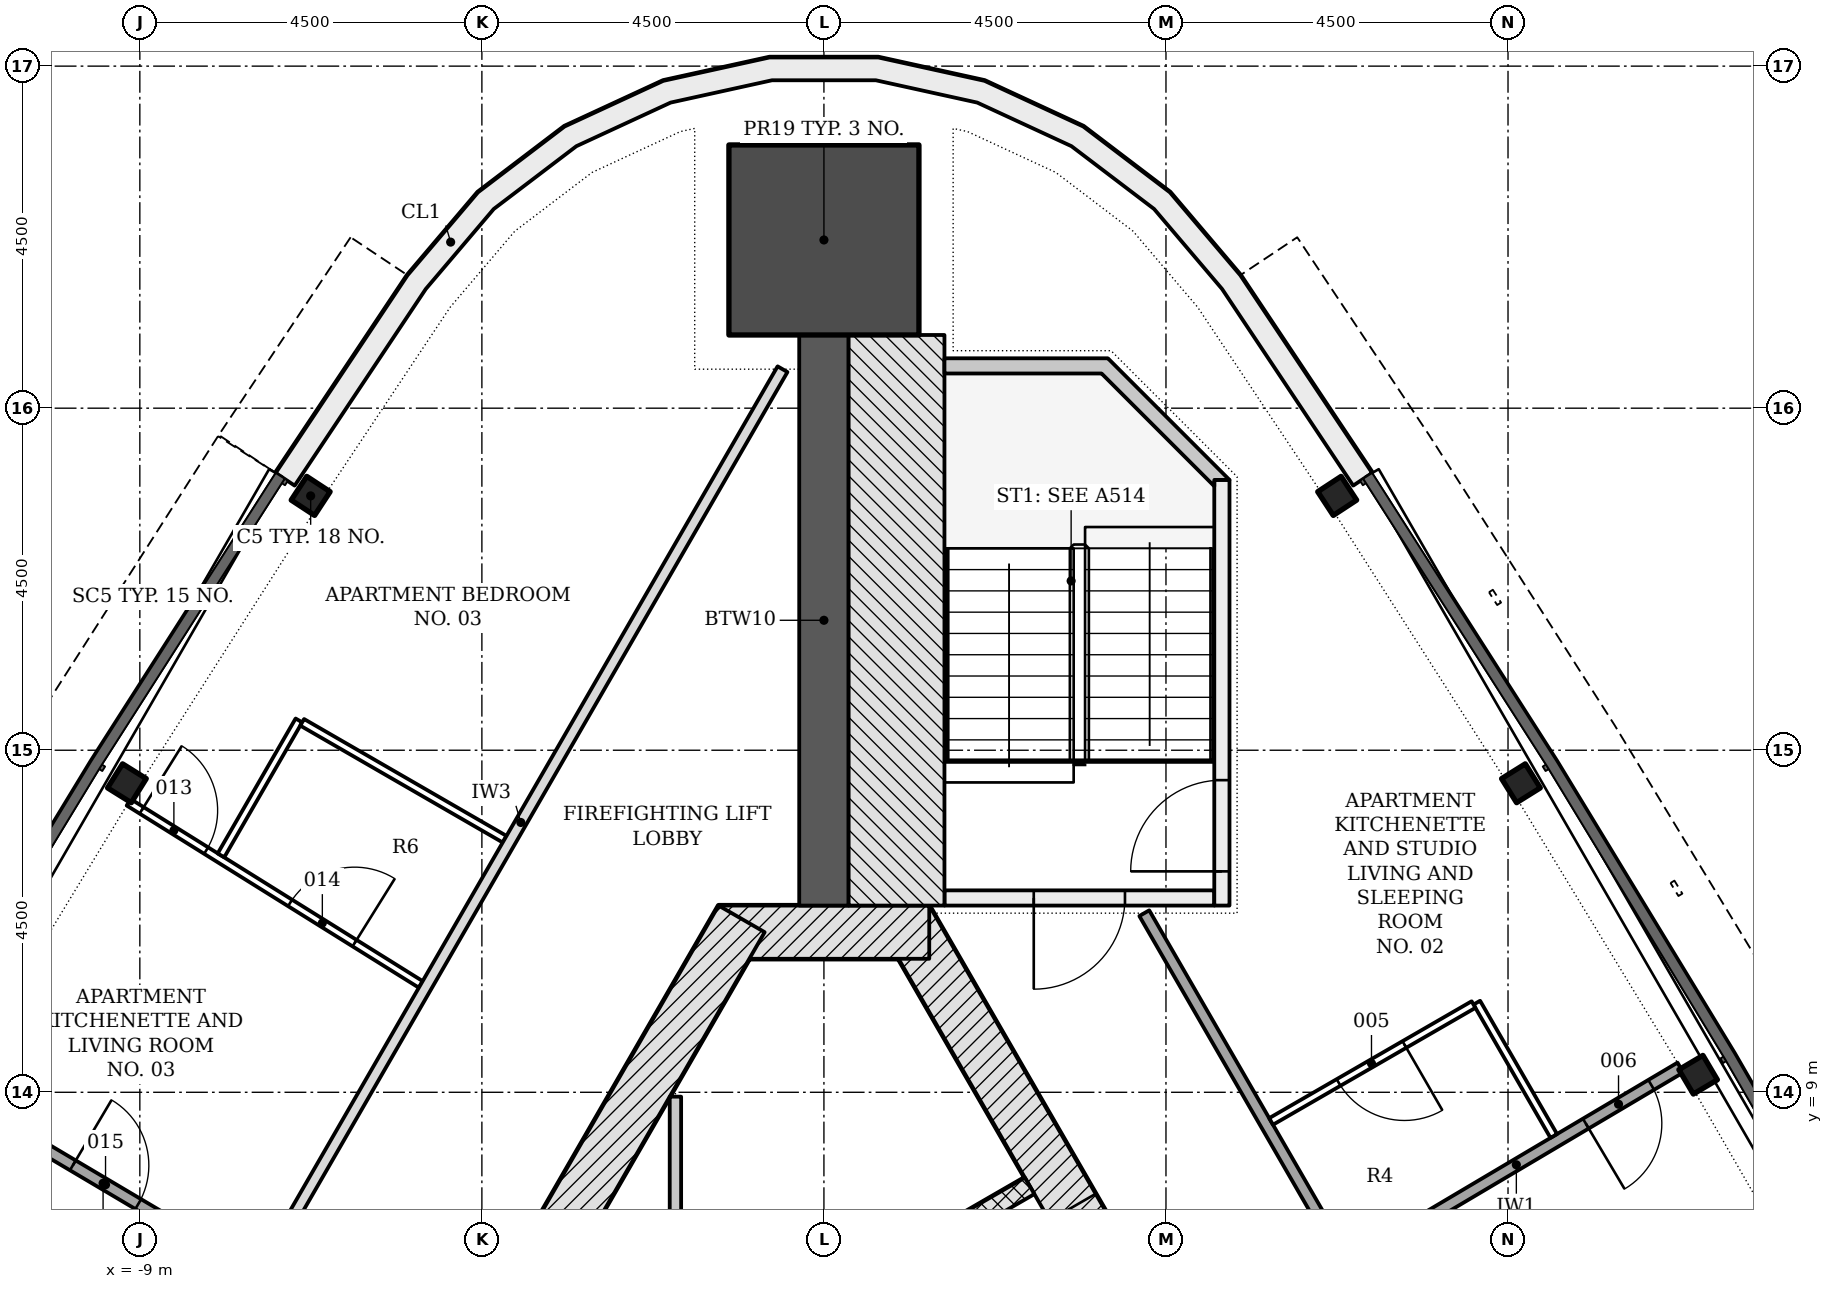
"""IFC4 building model, lengths in metres.
Left out: names, types, materials, properties, quantities, classifications, styles, units other than length and angle.
Written with IfcOpenShell. Run it as: python <this file> out.ifc"""

import sys

from ifc_helpers import new_model, si_unit, direction, frame, frame_2d, origin, origin_2d, place, context, subcontext, project, spatial, polyline, rectangle, i_section, outline, extrude, element, fill, save


model = new_model("IFC4")
c1 = context("Model", 3, precision=1e-05, world=origin(), true_north=direction((0.0, 1.0)))
c2 = subcontext(c1, "Body", "Model", "MODEL_VIEW")
j1 = project(units=[si_unit("LENGTHUNIT", "METRE"), si_unit("PLANEANGLEUNIT", "RADIAN")], contexts=[c1])
p1 = place(None, origin())
s1 = spatial("IfcSite", under=j1, at=p1, CompositionType="ELEMENT")
p2 = place(p1, origin())
s2 = spatial("IfcBuilding", under=s1, at=p2, CompositionType="ELEMENT")
p3 = place(p2, frame((0.0, 0.0, 232.8)))
s3 = spatial("IfcBuildingStorey", under=s2, at=p3, CompositionType="ELEMENT", Elevation=232.8)
p4 = place(p3, frame((10.311, -4.703, -0.2), z_axis=(0.0, 0.0, 1.0), x_axis=(-0.500001446645, 0.866024568562, 0.0)))
e1 = element("IfcWall", 1, at=p4, inside=s3, PredefinedType="SHEAR", context=c2, shape_type="SweptSolid", body=[
    extrude(rectangle(XDim=18.458, YDim=0.7, at=frame_2d((9.229, 0.0))), origin(), (0.0, 0.0, 1.0), 3.6),
])
p5 = place(p4, frame((4.379, 0.0, 0.2)))
e2 = element("IfcOpeningElement", 2, at=p5, cuts=e1, PredefinedType="OPENING", context=c2, shape_type="SweptSolid", body=[
    extrude(rectangle(XDim=1.1, YDim=2.1, at=frame_2d((0.55, 1.05))), frame((0.0, 0.36, 0.0), z_axis=(0.0, -1.0, 0.0), x_axis=(1.0, 0.0, 0.0)), (0.0, 0.0, 1.0), 0.72),
])
p6 = place(p4, frame((6.529, 0.0, 0.2)))
e3 = element("IfcOpeningElement", 3, at=p6, cuts=e1, PredefinedType="OPENING", context=c2, shape_type="SweptSolid", body=[
    extrude(rectangle(XDim=1.1, YDim=2.1, at=frame_2d((0.55, 1.05))), frame((0.0, 0.36, 0.0), z_axis=(0.0, -1.0, 0.0), x_axis=(1.0, 0.0, 0.0)), (0.0, 0.0, 1.0), 0.72),
])
p7 = place(p4, frame((8.679, 0.0, 0.2)))
e4 = element("IfcOpeningElement", 4, at=p7, cuts=e1, PredefinedType="OPENING", context=c2, shape_type="SweptSolid", body=[
    extrude(rectangle(XDim=1.1, YDim=2.1, at=frame_2d((0.55, 1.05))), frame((0.0, 0.36, 0.0), z_axis=(0.0, -1.0, 0.0), x_axis=(1.0, 0.0, 0.0)), (0.0, 0.0, 1.0), 0.72),
])
p8 = place(p4, frame((10.829, 0.0, 0.2)))
e5 = element("IfcOpeningElement", 5, at=p8, cuts=e1, PredefinedType="OPENING", context=c2, shape_type="SweptSolid", body=[
    extrude(rectangle(XDim=1.1, YDim=2.1, at=frame_2d((0.55, 1.05))), frame((0.0, 0.36, 0.0), z_axis=(0.0, -1.0, 0.0), x_axis=(1.0, 0.0, 0.0)), (0.0, 0.0, 1.0), 0.72),
])
p9 = place(p4, frame((12.979, 0.0, 0.2)))
e6 = element("IfcOpeningElement", 6, at=p9, cuts=e1, PredefinedType="OPENING", context=c2, shape_type="SweptSolid", body=[
    extrude(rectangle(XDim=1.1, YDim=2.1, at=frame_2d((0.55, 1.05))), frame((0.0, 0.36, 0.0), z_axis=(0.0, -1.0, 0.0), x_axis=(1.0, 0.0, 0.0)), (0.0, 0.0, 1.0), 0.72),
])
p10 = place(p3, frame((1.386, 11.106, -0.2), z_axis=(0.0, 0.0, 1.0), x_axis=(-1.0, 0.0, 0.0)))
e7 = element("IfcWall", 7, at=p10, inside=s3, PredefinedType="SHEAR", context=c2, shape_type="SweptSolid", body=[
    extrude(rectangle(XDim=2.771, YDim=0.7, at=frame_2d((1.386, 0.0))), origin(), (0.0, 0.0, 1.0), 3.6),
])
p11 = place(p3, frame((-1.083, 11.281, -0.2), z_axis=(0.0, 0.0, 1.0), x_axis=(-0.500001446645, -0.866024568562, 0.0)))
e8 = element("IfcWall", 8, at=p11, inside=s3, PredefinedType="SHEAR", context=c2, shape_type="SweptSolid", body=[
    extrude(rectangle(XDim=18.458, YDim=0.7, at=frame_2d((9.229, 0.0))), origin(), (0.0, 0.0, 1.0), 3.6),
])
p12 = place(p11, frame((8.979, 0.0, 0.2)))
e9 = element("IfcOpeningElement", 9, at=p12, cuts=e8, PredefinedType="OPENING", context=c2, shape_type="SweptSolid", body=[
    extrude(rectangle(XDim=1.2, YDim=2.1, at=frame_2d((0.6, 1.05))), frame((0.0, 0.36, 0.0), z_axis=(0.0, -1.0, 0.0), x_axis=(1.0, 0.0, 0.0)), (0.0, 0.0, 1.0), 0.72),
])
p13 = place(p11, frame((11.029, 0.0, 0.2)))
e10 = element("IfcOpeningElement", 10, at=p13, cuts=e8, PredefinedType="OPENING", context=c2, shape_type="SweptSolid", body=[
    extrude(rectangle(XDim=1.2, YDim=2.1, at=frame_2d((0.6, 1.05))), frame((0.0, 0.36, 0.0), z_axis=(0.0, -1.0, 0.0), x_axis=(1.0, 0.0, 0.0)), (0.0, 0.0, 1.0), 0.72),
])
p14 = place(p3, frame((0.0, 11.456, -0.2), z_axis=(0.0, 0.0, 1.0), x_axis=(0.0, 1.0, 0.0)))
e11 = element("IfcWall", 11, at=p14, inside=s3, PredefinedType="SHEAR", context=c2, shape_type="SweptSolid", body=[
    extrude(rectangle(XDim=7.507, YDim=0.65, at=frame_2d((3.753, 0.0))), origin(), (0.0, 0.0, 1.0), 3.6),
])
p15 = place(p3, frame((0.0, 20.213, -0.2), z_axis=(0.0, 0.0, 1.0), x_axis=(0.0, 1.0, 0.0)))
e12 = element("IfcColumn", 12, at=p15, inside=s3, PredefinedType="COLUMN", context=c2, shape_type="SweptSolid", body=[
    extrude(rectangle(XDim=2.5, YDim=2.5, at=origin_2d()), origin(), (0.0, 0.0, 1.0), 3.6),
])
for number, where, z_axis, x_axis in (
    (13, (-6.753, 16.846, -0.2), (0.0, 0.0, 1.0), (-0.548, -0.836, 0.0)),
    (14, (-9.17, 13.065, -0.2), (0.0, 0.0, 1.0), (-0.529, -0.849, 0.0)),
    (15, (11.501, 9.231, -0.2), (0.0, 0.0, 1.0), (-0.51, 0.86, 0.0)),
    (16, (9.17, 13.065, -0.2), (0.0, 0.0, 1.0), (-0.529, 0.849, 0.0)),
    (17, (6.753, 16.846, -0.2), (0.0, 0.0, 1.0), (-0.548, 0.836, 0.0)),
):
    element("IfcColumn", number, at=place(p3, frame(where, z_axis=z_axis, x_axis=x_axis)), inside=s3, PredefinedType="COLUMN", context=c2, shape_type="SweptSolid", body=[
        extrude(i_section(OverallWidth=0.373, OverallDepth=0.368, WebThickness=0.015, FlangeThickness=0.024, FilletRadius=0.015, at=origin_2d()), origin(), (0.0, 0.0, 1.0), 3.6),
    ])
p16 = place(p3, origin())
e18 = element("IfcWall", 18, at=p16, inside=s3, PredefinedType="NOTDEFINED", context=c2, shape_type="SweptSolid", body=[
    extrude(outline(polyline([(7.213, 17.148), (5.478, 19.749), (4.551, 20.84), (3.412, 21.706), (2.113, 22.306), (0.716, 22.614), (-0.716, 22.614), (-2.113, 22.306), (-3.412, 21.706), (-4.551, 20.84), (-5.478, 19.749), (-7.213, 17.148), (-6.963, 16.981), (-5.238, 19.568), (-4.344, 20.621), (-3.256, 21.447), (-2.017, 22.021), (-0.683, 22.314), (0.683, 22.314), (2.017, 22.021), (3.256, 21.447), (4.344, 20.621), (5.238, 19.568), (6.963, 16.981), (7.213, 17.148)])), origin(), (0.0, 0.0, 1.0), 3.3),
])
p17 = place(p3, frame((2.706, 7.769, -0.2), z_axis=(0.0, 0.0, 1.0), x_axis=(-0.866022959057, -0.500004234368, 0.0)))
e19 = element("IfcWall", 19, at=p17, inside=s3, PredefinedType="PARTITIONING", context=c2, shape_type="SweptSolid", body=[
    extrude(rectangle(XDim=2.5, YDim=0.25, at=frame_2d((1.25, 0.0))), origin(), (0.0, 0.0, 1.0), 3.6),
])
p18 = place(p3, frame((-1.954, 8.942, 0.0), z_axis=(0.0, 0.0, 1.0), x_axis=(0.0, -1.0, 0.0)))
e20 = element("IfcWall", 20, at=p18, inside=s3, PredefinedType="PARTITIONING", context=c2, shape_type="SweptSolid", body=[
    extrude(rectangle(XDim=15.171, YDim=0.15, at=frame_2d((7.585, 0.0))), origin(), (0.0, 0.0, 1.0), 3.4),
])
p19 = place(p18, frame((7.121, 0.0, 0.0)))
e21 = element("IfcOpeningElement", 21, at=p19, cuts=e20, PredefinedType="OPENING", context=c2, shape_type="SweptSolid", body=[
    extrude(rectangle(XDim=0.9, YDim=2.1, at=frame_2d((0.45, 1.05))), frame((0.0, 0.085, 0.0), z_axis=(0.0, -1.0, 0.0), x_axis=(1.0, 0.0, 0.0)), (0.0, 0.0, 1.0), 0.17),
])
p20 = place(p3, frame((5.135, 11.556, -0.2), z_axis=(0.0, 0.0, 1.0), x_axis=(-1.0, 0.0, 0.0)))
e22 = element("IfcWall", 22, at=p20, inside=s3, PredefinedType="SHEAR", context=c2, shape_type="SweptSolid", body=[
    extrude(rectangle(XDim=3.55, YDim=0.2, at=frame_2d((1.775, 0.0))), origin(), (0.0, 0.0, 1.0), 3.6),
])
p21 = place(p20, frame((1.175, 0.0, 0.2)))
e23 = element("IfcOpeningElement", 23, at=p21, cuts=e22, PredefinedType="OPENING", context=c2, shape_type="SweptSolid", body=[
    extrude(rectangle(XDim=1.2, YDim=2.1, at=frame_2d((0.6, 1.05))), frame((0.0, 0.11, 0.0), z_axis=(0.0, -1.0, 0.0), x_axis=(1.0, 0.0, 0.0)), (0.0, 0.0, 1.0), 0.22),
])
p22 = place(p3, frame((5.236, 11.456, -0.2), z_axis=(0.0, 0.0, 1.0), x_axis=(0.0, 1.0, 0.0)))
e24 = element("IfcWall", 24, at=p22, inside=s3, PredefinedType="SHEAR", context=c2, shape_type="SweptSolid", body=[
    extrude(rectangle(XDim=5.6, YDim=0.2, at=frame_2d((2.8, 0.0))), origin(), (0.0, 0.0, 1.0), 3.6),
])
p23 = place(p22, frame((0.45, 0.0, 0.2)))
e25 = element("IfcOpeningElement", 25, at=p23, cuts=e24, PredefinedType="OPENING", context=c2, shape_type="SweptSolid", body=[
    extrude(rectangle(XDim=1.2, YDim=2.1, at=frame_2d((0.6, 1.05))), frame((0.0, 0.11, 0.0), z_axis=(0.0, -1.0, 0.0), x_axis=(1.0, 0.0, 0.0)), (0.0, 0.0, 1.0), 0.22),
])
p24 = place(p3, frame((0.955, 11.456, -0.2), z_axis=(0.0, 0.0, 1.0), x_axis=(0.0, 1.0, 0.0)))
e26 = element("IfcWall", 26, at=p24, inside=s3, PredefinedType="SHEAR", context=c2, shape_type="SweptSolid", body=[
    extrude(rectangle(XDim=7.507, YDim=1.261, at=frame_2d((3.753, 0.0))), origin(), (0.0, 0.0, 1.0), 3.6),
])
p25 = place(p3, frame((0.0, 0.0, -0.2)))
e27 = element("IfcWall", 27, at=p25, inside=s3, PredefinedType="SHEAR", context=c2, shape_type="SweptSolid", body=[
    extrude(outline(polyline([(5.336, 17.056), (3.736, 18.656), (1.586, 18.656), (1.586, 18.456), (3.653, 18.456), (5.135, 16.974), (5.135, 17.056), (5.135, 17.056), (5.135, 17.056), (5.135, 17.056), (5.135, 17.056), (5.135, 17.056), (5.135, 17.056), (5.135, 17.056), (5.135, 17.056), (5.135, 17.056), (5.135, 17.056), (5.135, 17.056), (5.135, 17.056), (5.135, 17.056), (5.135, 17.056), (5.135, 17.056), (5.135, 17.056), (5.336, 17.056)])), origin(), (0.0, 0.0, 1.0), 3.6),
])
p26 = place(p3, frame((6.886, 6.729, 0.0), z_axis=(0.0, 0.0, 1.0), x_axis=(-0.4999966759, 0.866027322946, 0.0)))
e28 = element("IfcWall", 28, at=p26, inside=s3, PredefinedType="PARTITIONING", context=c2, shape_type="SweptSolid", body=[
    extrude(rectangle(XDim=5.343, YDim=0.15, at=frame_2d((2.672, 0.0))), origin(), (0.0, 0.0, 1.0), 2.852),
])
p27 = place(p3, frame((11.268, 9.325, 0.0), z_axis=(0.0, 0.0, 1.0), x_axis=(-0.860287582295, -0.509809058128, 0.0)))
e29 = element("IfcWall", 29, at=p27, inside=s3, PredefinedType="PARTITIONING", context=c2, shape_type="SweptSolid", body=[
    extrude(rectangle(XDim=5.018, YDim=0.15, at=frame_2d((2.509, 0.0))), origin(), (0.0, 0.0, 1.0), 3.4),
])
p28 = place(p27, frame((0.447, 0.0, 0.0)))
e30 = element("IfcOpeningElement", 30, at=p28, cuts=e29, PredefinedType="OPENING", context=c2, shape_type="SweptSolid", body=[
    extrude(rectangle(XDim=1.0, YDim=2.1, at=frame_2d((0.5, 1.05))), frame((0.0, 0.085, 0.0), z_axis=(0.0, -1.0, 0.0), x_axis=(1.0, 0.0, 0.0)), (0.0, 0.0, 1.0), 0.17),
])
p29 = place(p3, frame((9.602, 8.425, 0.0), z_axis=(0.0, 0.0, 1.0), x_axis=(-0.500080744026, 0.86597878118, 0.0)))
e31 = element("IfcWall", 31, at=p29, inside=s3, PredefinedType="PARTITIONING", context=c2, shape_type="SweptSolid", body=[
    extrude(rectangle(XDim=2.025, YDim=0.1, at=frame_2d((1.013, 0.0))), origin(), (0.0, 0.0, 1.0), 3.4),
])
p30 = place(p3, frame((8.546, 10.154, 0.0), z_axis=(0.0, 0.0, 1.0), x_axis=(-0.866016353143, -0.500015675843, 0.0)))
e32 = element("IfcWall", 32, at=p30, inside=s3, PredefinedType="PARTITIONING", context=c2, shape_type="SweptSolid", body=[
    extrude(rectangle(XDim=3.075, YDim=0.1, at=frame_2d((1.538, 0.0))), origin(), (0.0, 0.0, 1.0), 3.4),
])
p31 = place(p30, frame((1.05, 0.0, 0.0)))
e33 = element("IfcOpeningElement", 33, at=p31, cuts=e32, PredefinedType="OPENING", context=c2, shape_type="SweptSolid", body=[
    extrude(rectangle(XDim=1.0, YDim=2.1, at=frame_2d((0.5, 1.05))), frame((0.0, 0.06, 0.0), z_axis=(0.0, -1.0, 0.0), x_axis=(1.0, 0.0, 0.0)), (0.0, 0.0, 1.0), 0.12),
])
p32 = place(p3, frame((-0.545, 18.513, 0.0), z_axis=(0.0, 0.0, 1.0), x_axis=(-0.499998165157, -0.866026463129, 0.0)))
e34 = element("IfcWall", 34, at=p32, inside=s3, PredefinedType="PARTITIONING", context=c2, shape_type="SweptSolid", body=[
    extrude(rectangle(XDim=13.771, YDim=0.15, at=frame_2d((6.886, 0.0))), origin(), (0.0, 0.0, 1.0), 2.852),
])
p33 = place(p3, frame((-11.472, 8.981, 0.0), z_axis=(0.0, 0.0, 1.0), x_axis=(0.860336137803, -0.509727113257, 0.0)))
e35 = element("IfcWall", 35, at=p33, inside=s3, PredefinedType="PARTITIONING", context=c2, shape_type="SweptSolid", body=[
    extrude(rectangle(XDim=4.623, YDim=0.15, at=frame_2d((2.312, 0.0))), origin(), (0.0, 0.0, 1.0), 3.4),
])
p34 = place(p33, frame((1.849, 0.0, 0.0)))
e36 = element("IfcOpeningElement", 36, at=p34, cuts=e35, PredefinedType="OPENING", context=c2, shape_type="SweptSolid", body=[
    extrude(rectangle(XDim=1.0, YDim=2.1, at=frame_2d((0.5, 1.05))), frame((0.0, 0.085, 0.0), z_axis=(0.0, -1.0, 0.0), x_axis=(1.0, 0.0, 0.0)), (0.0, 0.0, 1.0), 0.17),
])
p35 = place(p3, frame((-9.146, 12.815, 0.0), z_axis=(0.0, 0.0, 1.0), x_axis=(0.848537029676, -0.52913600262, 0.0)))
e37 = element("IfcWall", 37, at=p35, inside=s3, PredefinedType="PARTITIONING", context=c2, shape_type="SweptSolid", body=[
    extrude(rectangle(XDim=4.528, YDim=0.1, at=frame_2d((2.264, 0.0))), origin(), (0.0, 0.0, 1.0), 3.4),
])
p36 = place(p35, frame((0.201, 0.0, 0.0)))
e38 = element("IfcOpeningElement", 38, at=p36, cuts=e37, PredefinedType="OPENING", context=c2, shape_type="SweptSolid", body=[
    extrude(rectangle(XDim=1.0, YDim=2.1, at=frame_2d((0.5, 1.05))), frame((0.0, 0.06, 0.0), z_axis=(0.0, -1.0, 0.0), x_axis=(1.0, 0.0, 0.0)), (0.0, 0.0, 1.0), 0.12),
])
p37 = place(p35, frame((2.502, 0.0, 0.0)))
e39 = element("IfcOpeningElement", 39, at=p37, cuts=e37, PredefinedType="OPENING", context=c2, shape_type="SweptSolid", body=[
    extrude(rectangle(XDim=1.0, YDim=2.1, at=frame_2d((0.5, 1.05))), frame((0.0, 0.06, 0.0), z_axis=(0.0, -1.0, 0.0), x_axis=(1.0, 0.0, 0.0)), (0.0, 0.0, 1.0), 0.12),
])
p38 = place(p3, frame((-7.932, 12.117, 0.0), z_axis=(0.0, 0.0, 1.0), x_axis=(0.499956128963, 0.866050731258, 0.0)))
e40 = element("IfcWall", 40, at=p38, inside=s3, PredefinedType="PARTITIONING", context=c2, shape_type="SweptSolid", body=[
    extrude(rectangle(XDim=2.05, YDim=0.1, at=frame_2d((1.025, 0.0))), origin(), (0.0, 0.0, 1.0), 2.852),
])
p39 = place(p3, frame((-6.864, 13.867, 0.0), z_axis=(0.0, 0.0, 1.0), x_axis=(0.866016353143, -0.500015675843, 0.0)))
e41 = element("IfcWall", 41, at=p39, inside=s3, PredefinedType="PARTITIONING", context=c2, shape_type="SweptSolid", body=[
    extrude(rectangle(XDim=3.075, YDim=0.1, at=frame_2d((1.538, 0.0))), origin(), (0.0, 0.0, 1.0), 3.4),
])
p40 = place(p9, origin())
e42 = element("IfcDoor", 42, at=p40, inside=s3, OperationType="DOUBLE_DOOR_SLIDING", PredefinedType="DOOR", context=c2, shape_type="SweptSolid", body=[
    extrude(rectangle(XDim=1.1, YDim=2.1, at=frame_2d((0.55, 1.05))), frame((0.0, 0.025, 0.0), z_axis=(0.0, -1.0, 0.0), x_axis=(1.0, 0.0, 0.0)), (0.0, 0.0, 1.0), 0.05),
])
fill(e6, e42)
p41 = place(p21, origin())
e43 = element("IfcDoor", 43, at=p41, inside=s3, OperationType="SINGLE_SWING_RIGHT", PredefinedType="DOOR", context=c2, shape_type="SweptSolid", body=[
    extrude(rectangle(XDim=1.2, YDim=2.1, at=frame_2d((0.6, 1.05))), frame((0.0, 0.025, 0.0), z_axis=(0.0, -1.0, 0.0), x_axis=(1.0, 0.0, 0.0)), (0.0, 0.0, 1.0), 0.05),
])
fill(e23, e43)
p42 = place(p23, origin())
e44 = element("IfcDoor", 44, at=p42, inside=s3, OperationType="SINGLE_SWING_LEFT", PredefinedType="DOOR", context=c2, shape_type="SweptSolid", body=[
    extrude(rectangle(XDim=1.2, YDim=2.1, at=frame_2d((0.6, 1.05))), frame((0.0, 0.025, 0.0), z_axis=(0.0, -1.0, 0.0), x_axis=(1.0, 0.0, 0.0)), (0.0, 0.0, 1.0), 0.05),
])
fill(e25, e44)
p43 = place(p31, origin())
e45 = element("IfcDoor", 45, at=p43, inside=s3, OperationType="SINGLE_SWING_LEFT", PredefinedType="DOOR", context=c2, shape_type="SweptSolid", body=[
    extrude(rectangle(XDim=1.0, YDim=2.1, at=frame_2d((0.5, 1.05))), frame((0.0, 0.025, 0.0), z_axis=(0.0, -1.0, 0.0), x_axis=(1.0, 0.0, 0.0)), (0.0, 0.0, 1.0), 0.05),
])
fill(e33, e45)
p44 = place(p28, origin())
e46 = element("IfcDoor", 46, at=p44, inside=s3, OperationType="SINGLE_SWING_RIGHT", PredefinedType="DOOR", context=c2, shape_type="SweptSolid", body=[
    extrude(rectangle(XDim=1.0, YDim=2.1, at=frame_2d((0.5, 1.05))), frame((0.0, 0.025, 0.0), z_axis=(0.0, -1.0, 0.0), x_axis=(1.0, 0.0, 0.0)), (0.0, 0.0, 1.0), 0.05),
])
fill(e30, e46)
p45 = place(p36, origin())
e47 = element("IfcDoor", 47, at=p45, inside=s3, OperationType="SINGLE_SWING_LEFT", PredefinedType="DOOR", context=c2, shape_type="SweptSolid", body=[
    extrude(rectangle(XDim=1.0, YDim=2.1, at=frame_2d((0.5, 1.05))), frame((0.0, 0.025, 0.0), z_axis=(0.0, -1.0, 0.0), x_axis=(1.0, 0.0, 0.0)), (0.0, 0.0, 1.0), 0.05),
])
fill(e38, e47)
p46 = place(p37, origin())
e48 = element("IfcDoor", 48, at=p46, inside=s3, OperationType="SINGLE_SWING_RIGHT", PredefinedType="DOOR", context=c2, shape_type="SweptSolid", body=[
    extrude(rectangle(XDim=1.0, YDim=2.1, at=frame_2d((0.5, 1.05))), frame((0.0, 0.025, 0.0), z_axis=(0.0, -1.0, 0.0), x_axis=(1.0, 0.0, 0.0)), (0.0, 0.0, 1.0), 0.05),
])
fill(e39, e48)
p47 = place(p34, origin())
e49 = element("IfcDoor", 49, at=p47, inside=s3, OperationType="SINGLE_SWING_LEFT", PredefinedType="DOOR", context=c2, shape_type="SweptSolid", body=[
    extrude(rectangle(XDim=1.0, YDim=2.1, at=frame_2d((0.5, 1.05))), frame((0.0, 0.025, 0.0), z_axis=(0.0, -1.0, 0.0), x_axis=(1.0, 0.0, 0.0)), (0.0, 0.0, 1.0), 0.05),
])
fill(e36, e49)
save(model, sys.argv[1])
